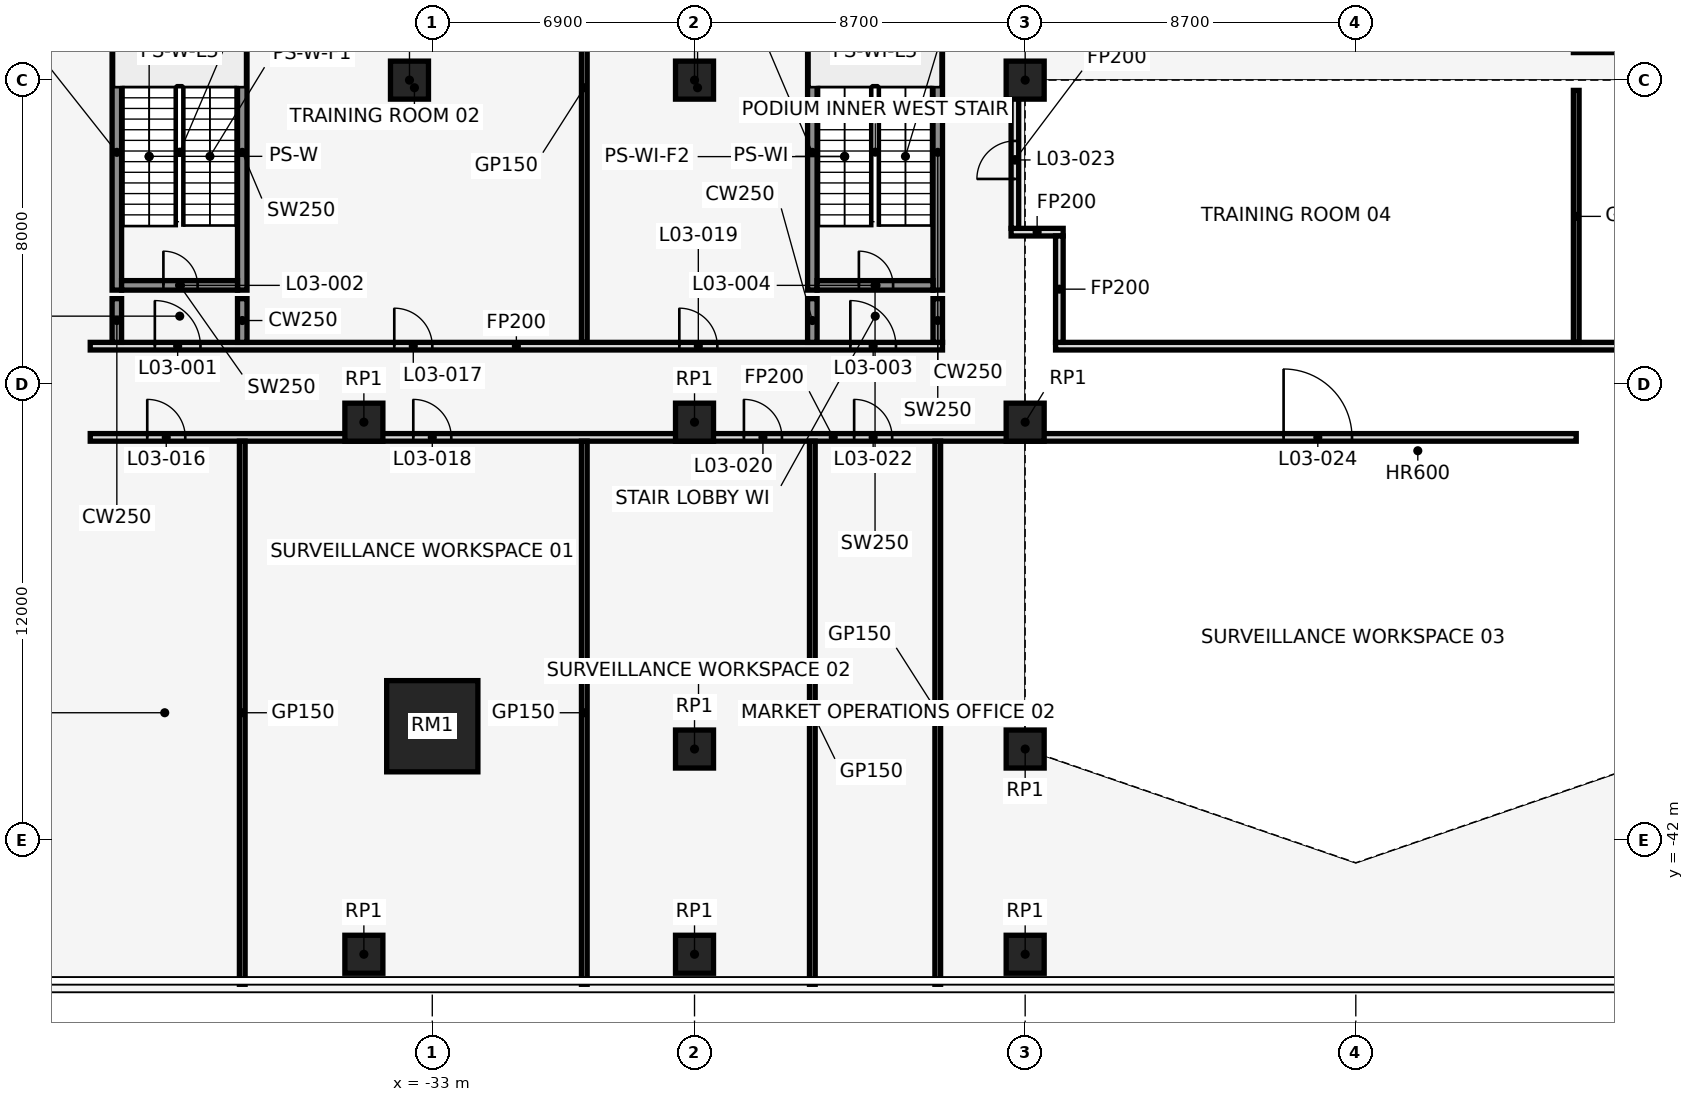
"""IFC4 building model, lengths in metres.
Left out: names, types, materials, properties, quantities, classifications, styles, units other than length and angle.
Written with IfcOpenShell. Run it as: python <this file> out.ifc"""

import sys

from ifc_helpers import new_model, si_unit, direction, frame, frame_2d, origin, origin_2d, place, context, subcontext, project, spatial, rectangle, extrude, element, fill, save


model = new_model("IFC4")
c1 = context("Model", 3, precision=1e-05, world=origin(), true_north=direction((0.0, 1.0)))
c2 = subcontext(c1, "Body", "Model", "MODEL_VIEW")
j1 = project(units=[si_unit("LENGTHUNIT", "METRE"), si_unit("PLANEANGLEUNIT", "RADIAN")], contexts=[c1])
p1 = place(None, origin())
s1 = spatial("IfcSite", under=j1, at=p1, CompositionType="ELEMENT")
p2 = place(p1, origin())
s2 = spatial("IfcBuilding", under=s1, at=p2, CompositionType="ELEMENT")
p3 = place(p2, frame((0.0, 0.0, 20.0)))
s3 = spatial("IfcBuildingStorey", under=s2, at=p3, CompositionType="ELEMENT", Elevation=20.0)
p4 = place(p3, frame((-33.0, -39.0, 0.0), z_axis=(0.0, 0.0, 1.0), x_axis=(1.0, 0.0, 0.0)))
e1 = element("IfcColumn", 1, at=p4, inside=s3, PredefinedType="COLUMN", context=c2, shape_type="SweptSolid", body=[
    extrude(rectangle(XDim=2.4, YDim=2.4, at=origin_2d()), origin(), (0.0, 0.0, 1.0), 5.0),
])
for number, where, z_axis, x_axis in (
    (2, (-26.1, -39.6, 0.0), (0.0, 0.0, 1.0), (1.0, 0.0, 0.0)),
    (3, (-17.4, -39.6, 0.0), (0.0, 0.0, 1.0), (1.0, 0.0, 0.0)),
    (4, (-33.6, -22.0, 0.0), (0.0, 0.0, 1.0), (1.0, 0.0, 0.0)),
    (5, (-26.1, -22.0, 0.0), (0.0, 0.0, 1.0), (1.0, 0.0, 0.0)),
    (6, (-17.4, -22.0, 0.0), (0.0, 0.0, 1.0), (1.0, 0.0, 0.0)),
    (7, (-34.8, -31.0, 0.0), (0.0, 0.0, 1.0), (1.0, 0.0, 0.0)),
    (8, (-34.8, -45.0, 0.0), (0.0, 0.0, 1.0), (1.0, 0.0, 0.0)),
    (9, (-26.1, -31.0, 0.0), (0.0, 0.0, 1.0), (1.0, 0.0, 0.0)),
    (10, (-26.1, -45.0, 0.0), (0.0, 0.0, 1.0), (1.0, 0.0, 0.0)),
    (11, (-17.4, -31.0, 0.0), (0.0, 0.0, 1.0), (1.0, 0.0, 0.0)),
    (12, (-17.4, -45.0, 0.0), (0.0, 0.0, 1.0), (1.0, 0.0, 0.0)),
):
    element("IfcColumn", number, at=place(p3, frame(where, z_axis=z_axis, x_axis=x_axis)), inside=s3, PredefinedType="COLUMN", context=c2, shape_type="SweptSolid", body=[
        extrude(rectangle(XDim=1.0, YDim=1.0, at=origin_2d()), origin(), (0.0, 0.0, 1.0), 5.0),
    ])
for number, where, z_axis, x_axis in (
    (13, (-41.3, -27.525, 0.0), (0.0, 0.0, 1.0), (0.0, 1.0, 0.0)),
    (14, (-38.0, -27.525, 0.0), (0.0, 0.0, 1.0), (0.0, 1.0, 0.0)),
):
    element("IfcWall", number, at=place(p3, frame(where, z_axis=z_axis, x_axis=x_axis)), inside=s3, PredefinedType="SHEAR", context=c2, shape_type="SweptSolid", body=[
        extrude(rectangle(XDim=7.25, YDim=0.25, at=frame_2d((3.625, 0.0))), origin(), (0.0, 0.0, 1.0), 5.0),
    ])
p5 = place(p3, frame((-41.175, -27.4, 0.0), z_axis=(0.0, 0.0, 1.0), x_axis=(1.0, 0.0, 0.0)))
e15 = element("IfcWall", 15, at=p5, inside=s3, PredefinedType="SHEAR", context=c2, shape_type="SweptSolid", body=[
    extrude(rectangle(XDim=3.05, YDim=0.25, at=frame_2d((1.525, 0.0))), origin(), (0.0, 0.0, 1.0), 5.0),
])
p6 = place(p5, frame((1.1, 0.0, 0.0)))
e16 = element("IfcOpeningElement", 16, at=p6, cuts=e15, PredefinedType="OPENING", context=c2, shape_type="SweptSolid", body=[
    extrude(rectangle(XDim=0.9, YDim=2.1, at=frame_2d((0.45, 1.05))), frame((0.0, 0.137, 0.0), z_axis=(0.0, -1.0, 0.0), x_axis=(1.0, 0.0, 0.0)), (0.0, 0.0, 1.0), 0.274),
])
for number, where, z_axis, x_axis in (
    (17, (-23.0, -27.525, 0.0), (0.0, 0.0, 1.0), (0.0, 1.0, 0.0)),
    (18, (-19.7, -27.525, 0.0), (0.0, 0.0, 1.0), (0.0, 1.0, 0.0)),
):
    element("IfcWall", number, at=place(p3, frame(where, z_axis=z_axis, x_axis=x_axis)), inside=s3, PredefinedType="SHEAR", context=c2, shape_type="SweptSolid", body=[
        extrude(rectangle(XDim=7.25, YDim=0.25, at=frame_2d((3.625, 0.0))), origin(), (0.0, 0.0, 1.0), 5.0),
    ])
p7 = place(p3, frame((-22.875, -27.4, 0.0), z_axis=(0.0, 0.0, 1.0), x_axis=(1.0, 0.0, 0.0)))
e19 = element("IfcWall", 19, at=p7, inside=s3, PredefinedType="SHEAR", context=c2, shape_type="SweptSolid", body=[
    extrude(rectangle(XDim=3.05, YDim=0.25, at=frame_2d((1.525, 0.0))), origin(), (0.0, 0.0, 1.0), 5.0),
])
p8 = place(p7, frame((1.1, 0.0, 0.0)))
e20 = element("IfcOpeningElement", 20, at=p8, cuts=e19, PredefinedType="OPENING", context=c2, shape_type="SweptSolid", body=[
    extrude(rectangle(XDim=0.9, YDim=2.1, at=frame_2d((0.45, 1.05))), frame((0.0, 0.137, 0.0), z_axis=(0.0, -1.0, 0.0), x_axis=(1.0, 0.0, 0.0)), (0.0, 0.0, 1.0), 0.274),
])
p9 = place(p3, frame((-42.0, -31.4, 0.0), z_axis=(0.0, 0.0, 1.0), x_axis=(1.0, 0.0, 0.0)))
e21 = element("IfcWall", 21, at=p9, inside=s3, PredefinedType="PARTITIONING", context=c2, shape_type="SweptSolid", body=[
    extrude(rectangle(XDim=39.1, YDim=0.2, at=frame_2d((19.55, 0.0))), origin(), (0.0, 0.0, 1.0), 4.7),
])
p10 = place(p9, frame((1.5, 0.0, 0.0)))
e22 = element("IfcOpeningElement", 22, at=p10, cuts=e21, PredefinedType="OPENING", context=c2, shape_type="SweptSolid", body=[
    extrude(rectangle(XDim=1.0, YDim=2.1, at=frame_2d((0.5, 1.05))), frame((0.0, 0.112, 0.0), z_axis=(0.0, -1.0, 0.0), x_axis=(1.0, 0.0, 0.0)), (0.0, 0.0, 1.0), 0.224),
])
p11 = place(p9, frame((8.5, 0.0, 0.0)))
e23 = element("IfcOpeningElement", 23, at=p11, cuts=e21, PredefinedType="OPENING", context=c2, shape_type="SweptSolid", body=[
    extrude(rectangle(XDim=1.0, YDim=2.1, at=frame_2d((0.5, 1.05))), frame((0.0, 0.112, 0.0), z_axis=(0.0, -1.0, 0.0), x_axis=(1.0, 0.0, 0.0)), (0.0, 0.0, 1.0), 0.224),
])
p12 = place(p9, frame((17.2, 0.0, 0.0)))
e24 = element("IfcOpeningElement", 24, at=p12, cuts=e21, PredefinedType="OPENING", context=c2, shape_type="SweptSolid", body=[
    extrude(rectangle(XDim=1.0, YDim=2.1, at=frame_2d((0.5, 1.05))), frame((0.0, 0.112, 0.0), z_axis=(0.0, -1.0, 0.0), x_axis=(1.0, 0.0, 0.0)), (0.0, 0.0, 1.0), 0.224),
])
p13 = place(p9, frame((20.1, 0.0, 0.0)))
e25 = element("IfcOpeningElement", 25, at=p13, cuts=e21, PredefinedType="OPENING", context=c2, shape_type="SweptSolid", body=[
    extrude(rectangle(XDim=1.0, YDim=2.1, at=frame_2d((0.5, 1.05))), frame((0.0, 0.112, 0.0), z_axis=(0.0, -1.0, 0.0), x_axis=(1.0, 0.0, 0.0)), (0.0, 0.0, 1.0), 0.224),
])
p14 = place(p9, frame((31.4, 0.0, 0.0)))
e26 = element("IfcOpeningElement", 26, at=p14, cuts=e21, PredefinedType="OPENING", context=c2, shape_type="SweptSolid", body=[
    extrude(rectangle(XDim=1.8, YDim=2.1, at=frame_2d((0.9, 1.05))), frame((0.0, 0.112, 0.0), z_axis=(0.0, -1.0, 0.0), x_axis=(1.0, 0.0, 0.0)), (0.0, 0.0, 1.0), 0.224),
])
p15 = place(p3, frame((-42.0, -29.0, 0.0), z_axis=(0.0, 0.0, 1.0), x_axis=(1.0, 0.0, 0.0)))
e27 = element("IfcWall", 27, at=p15, inside=s3, PredefinedType="PARTITIONING", context=c2, shape_type="SweptSolid", body=[
    extrude(rectangle(XDim=22.425, YDim=0.2, at=frame_2d((11.212, 0.0))), origin(), (0.0, 0.0, 1.0), 4.7),
])
p16 = place(p15, frame((1.7, 0.0, 0.0)))
e28 = element("IfcOpeningElement", 28, at=p16, cuts=e27, PredefinedType="OPENING", context=c2, shape_type="SweptSolid", body=[
    extrude(rectangle(XDim=1.2, YDim=2.1, at=frame_2d((0.6, 1.05))), frame((0.0, 0.112, 0.0), z_axis=(0.0, -1.0, 0.0), x_axis=(1.0, 0.0, 0.0)), (0.0, 0.0, 1.0), 0.224),
])
p17 = place(p15, frame((20.0, 0.0, 0.0)))
e29 = element("IfcOpeningElement", 29, at=p17, cuts=e27, PredefinedType="OPENING", context=c2, shape_type="SweptSolid", body=[
    extrude(rectangle(XDim=1.2, YDim=2.1, at=frame_2d((0.6, 1.05))), frame((0.0, 0.112, 0.0), z_axis=(0.0, -1.0, 0.0), x_axis=(1.0, 0.0, 0.0)), (0.0, 0.0, 1.0), 0.224),
])
p18 = place(p15, frame((8.0, 0.0, 0.0)))
e30 = element("IfcOpeningElement", 30, at=p18, cuts=e27, PredefinedType="OPENING", context=c2, shape_type="SweptSolid", body=[
    extrude(rectangle(XDim=1.0, YDim=2.1, at=frame_2d((0.5, 1.05))), frame((0.0, 0.112, 0.0), z_axis=(0.0, -1.0, 0.0), x_axis=(1.0, 0.0, 0.0)), (0.0, 0.0, 1.0), 0.224),
])
p19 = place(p15, frame((15.5, 0.0, 0.0)))
e31 = element("IfcOpeningElement", 31, at=p19, cuts=e27, PredefinedType="OPENING", context=c2, shape_type="SweptSolid", body=[
    extrude(rectangle(XDim=1.0, YDim=2.1, at=frame_2d((0.5, 1.05))), frame((0.0, 0.112, 0.0), z_axis=(0.0, -1.0, 0.0), x_axis=(1.0, 0.0, 0.0)), (0.0, 0.0, 1.0), 0.224),
])
p20 = place(p3, frame((-16.6, -29.0, 0.0), z_axis=(0.0, 0.0, 1.0), x_axis=(1.0, 0.0, 0.0)))
e32 = element("IfcWall", 32, at=p20, inside=s3, PredefinedType="PARTITIONING", context=c2, shape_type="SweptSolid", body=[
    extrude(rectangle(XDim=33.2, YDim=0.2, at=frame_2d((16.6, 0.0))), origin(), (0.0, 0.0, 1.0), 4.7),
])
p21 = place(p3, frame((-17.77, -26.0, 0.0), z_axis=(0.0, 0.0, 1.0), x_axis=(1.0, 0.0, 0.0)))
e33 = element("IfcWall", 33, at=p21, inside=s3, PredefinedType="PARTITIONING", context=c2, shape_type="SweptSolid", body=[
    extrude(rectangle(XDim=1.37, YDim=0.2, at=frame_2d((0.685, 0.0))), origin(), (0.0, 0.0, 1.0), 4.7),
])
p22 = place(p3, frame((-2.975, -21.2, 0.0), z_axis=(0.0, 0.0, 1.0), x_axis=(1.0, 0.0, 0.0)))
e34 = element("IfcWall", 34, at=p22, inside=s3, PredefinedType="PARTITIONING", context=c2, shape_type="SweptSolid", body=[
    extrude(rectangle(XDim=6.23, YDim=0.15, at=frame_2d((3.115, 0.0))), origin(), (0.0, 0.0, 1.0), 4.7),
])
p23 = place(p3, frame((-41.3, -28.9, 0.0), z_axis=(0.0, 0.0, 1.0), x_axis=(0.0, 1.0, 0.0)))
e35 = element("IfcWall", 35, at=p23, inside=s3, PredefinedType="SHEAR", context=c2, shape_type="SweptSolid", body=[
    extrude(rectangle(XDim=1.15, YDim=0.25, at=frame_2d((0.575, 0.0))), origin(), (0.0, 0.0, 1.0), 5.0),
])
p24 = place(p3, frame((-38.0, -45.79, 0.0), z_axis=(0.0, 0.0, 1.0), x_axis=(0.0, 1.0, 0.0)))
e36 = element("IfcWall", 36, at=p24, inside=s3, PredefinedType="PARTITIONING", context=c2, shape_type="SweptSolid", body=[
    extrude(rectangle(XDim=14.29, YDim=0.15, at=frame_2d((7.145, 0.0))), origin(), (0.0, 0.0, 1.0), 4.7),
])
p25 = place(p3, frame((-38.0, -28.9, 0.0), z_axis=(0.0, 0.0, 1.0), x_axis=(0.0, 1.0, 0.0)))
e37 = element("IfcWall", 37, at=p25, inside=s3, PredefinedType="SHEAR", context=c2, shape_type="SweptSolid", body=[
    extrude(rectangle(XDim=1.15, YDim=0.25, at=frame_2d((0.575, 0.0))), origin(), (0.0, 0.0, 1.0), 5.0),
])
p26 = place(p3, frame((-29.0, -45.79, 0.0), z_axis=(0.0, 0.0, 1.0), x_axis=(0.0, 1.0, 0.0)))
e38 = element("IfcWall", 38, at=p26, inside=s3, PredefinedType="PARTITIONING", context=c2, shape_type="SweptSolid", body=[
    extrude(rectangle(XDim=14.29, YDim=0.15, at=frame_2d((7.145, 0.0))), origin(), (0.0, 0.0, 1.0), 4.7),
])
p27 = place(p3, frame((-29.0, -28.9, 0.0), z_axis=(0.0, 0.0, 1.0), x_axis=(0.0, 1.0, 0.0)))
e39 = element("IfcWall", 39, at=p27, inside=s3, PredefinedType="PARTITIONING", context=c2, shape_type="SweptSolid", body=[
    extrude(rectangle(XDim=13.4, YDim=0.15, at=frame_2d((6.7, 0.0))), origin(), (0.0, 0.0, 1.0), 4.7),
])
p28 = place(p3, frame((-23.0, -45.79, 0.0), z_axis=(0.0, 0.0, 1.0), x_axis=(0.0, 1.0, 0.0)))
e40 = element("IfcWall", 40, at=p28, inside=s3, PredefinedType="PARTITIONING", context=c2, shape_type="SweptSolid", body=[
    extrude(rectangle(XDim=14.29, YDim=0.15, at=frame_2d((7.145, 0.0))), origin(), (0.0, 0.0, 1.0), 4.7),
])
p29 = place(p3, frame((-23.0, -28.9, 0.0), z_axis=(0.0, 0.0, 1.0), x_axis=(0.0, 1.0, 0.0)))
e41 = element("IfcWall", 41, at=p29, inside=s3, PredefinedType="SHEAR", context=c2, shape_type="SweptSolid", body=[
    extrude(rectangle(XDim=1.15, YDim=0.25, at=frame_2d((0.575, 0.0))), origin(), (0.0, 0.0, 1.0), 5.0),
])
p30 = place(p3, frame((-19.7, -45.79, 0.0), z_axis=(0.0, 0.0, 1.0), x_axis=(0.0, 1.0, 0.0)))
e42 = element("IfcWall", 42, at=p30, inside=s3, PredefinedType="PARTITIONING", context=c2, shape_type="SweptSolid", body=[
    extrude(rectangle(XDim=14.29, YDim=0.15, at=frame_2d((7.145, 0.0))), origin(), (0.0, 0.0, 1.0), 4.7),
])
p31 = place(p3, frame((-19.7, -28.9, 0.0), z_axis=(0.0, 0.0, 1.0), x_axis=(0.0, 1.0, 0.0)))
e43 = element("IfcWall", 43, at=p31, inside=s3, PredefinedType="SHEAR", context=c2, shape_type="SweptSolid", body=[
    extrude(rectangle(XDim=1.15, YDim=0.25, at=frame_2d((0.575, 0.0))), origin(), (0.0, 0.0, 1.0), 5.0),
])
p32 = place(p3, frame((-17.67, -25.9, 0.0), z_axis=(0.0, 0.0, 1.0), x_axis=(0.0, 1.0, 0.0)))
e44 = element("IfcWall", 44, at=p32, inside=s3, PredefinedType="PARTITIONING", context=c2, shape_type="SweptSolid", body=[
    extrude(rectangle(XDim=3.61, YDim=0.2, at=frame_2d((1.805, 0.0))), origin(), (0.0, 0.0, 1.0), 4.7),
])
p33 = place(p32, frame((1.3, 0.0, 0.0)))
e45 = element("IfcOpeningElement", 45, at=p33, cuts=e44, PredefinedType="OPENING", context=c2, shape_type="SweptSolid", body=[
    extrude(rectangle(XDim=1.0, YDim=2.1, at=frame_2d((0.5, 1.05))), frame((0.0, 0.112, 0.0), z_axis=(0.0, -1.0, 0.0), x_axis=(1.0, 0.0, 0.0)), (0.0, 0.0, 1.0), 0.224),
])
p34 = place(p3, frame((-16.5, -28.9, 0.0), z_axis=(0.0, 0.0, 1.0), x_axis=(0.0, 1.0, 0.0)))
e46 = element("IfcWall", 46, at=p34, inside=s3, PredefinedType="PARTITIONING", context=c2, shape_type="SweptSolid", body=[
    extrude(rectangle(XDim=2.8, YDim=0.2, at=frame_2d((1.4, 0.0))), origin(), (0.0, 0.0, 1.0), 4.7),
])
p35 = place(p3, frame((-2.9, -28.9, 0.0), z_axis=(0.0, 0.0, 1.0), x_axis=(0.0, 1.0, 0.0)))
e47 = element("IfcWall", 47, at=p35, inside=s3, PredefinedType="PARTITIONING", context=c2, shape_type="SweptSolid", body=[
    extrude(rectangle(XDim=6.63, YDim=0.15, at=frame_2d((3.315, 0.0))), origin(), (0.0, 0.0, 1.0), 4.7),
])
p36 = place(p16, origin())
e48 = element("IfcDoor", 48, at=p36, inside=s3, OperationType="SINGLE_SWING_LEFT", PredefinedType="DOOR", context=c2, shape_type="SweptSolid", body=[
    extrude(rectangle(XDim=1.2, YDim=2.1, at=frame_2d((0.6, 1.05))), frame((0.0, 0.025, 0.0), z_axis=(0.0, -1.0, 0.0), x_axis=(1.0, 0.0, 0.0)), (0.0, 0.0, 1.0), 0.05),
])
fill(e28, e48)
p37 = place(p6, origin())
e49 = element("IfcDoor", 49, at=p37, inside=s3, OperationType="SINGLE_SWING_LEFT", PredefinedType="DOOR", context=c2, shape_type="SweptSolid", body=[
    extrude(rectangle(XDim=0.9, YDim=2.1, at=frame_2d((0.45, 1.05))), frame((0.0, 0.025, 0.0), z_axis=(0.0, -1.0, 0.0), x_axis=(1.0, 0.0, 0.0)), (0.0, 0.0, 1.0), 0.05),
])
fill(e16, e49)
p38 = place(p17, origin())
e50 = element("IfcDoor", 50, at=p38, inside=s3, OperationType="SINGLE_SWING_RIGHT", PredefinedType="DOOR", context=c2, shape_type="SweptSolid", body=[
    extrude(rectangle(XDim=1.2, YDim=2.1, at=frame_2d((0.6, 1.05))), frame((0.0, 0.025, 0.0), z_axis=(0.0, -1.0, 0.0), x_axis=(1.0, 0.0, 0.0)), (0.0, 0.0, 1.0), 0.05),
])
fill(e29, e50)
p39 = place(p8, origin())
e51 = element("IfcDoor", 51, at=p39, inside=s3, OperationType="SINGLE_SWING_LEFT", PredefinedType="DOOR", context=c2, shape_type="SweptSolid", body=[
    extrude(rectangle(XDim=0.9, YDim=2.1, at=frame_2d((0.45, 1.05))), frame((0.0, 0.025, 0.0), z_axis=(0.0, -1.0, 0.0), x_axis=(1.0, 0.0, 0.0)), (0.0, 0.0, 1.0), 0.05),
])
fill(e20, e51)
p40 = place(p10, frame((1.0, 0.0, 0.0), z_axis=(0.0, 0.0, 1.0), x_axis=(-1.0, 0.0, 0.0)))
e52 = element("IfcDoor", 52, at=p40, inside=s3, OperationType="SINGLE_SWING_LEFT", PredefinedType="DOOR", context=c2, shape_type="SweptSolid", body=[
    extrude(rectangle(XDim=1.0, YDim=2.1, at=frame_2d((0.5, 1.05))), frame((0.0, 0.025, 0.0), z_axis=(0.0, -1.0, 0.0), x_axis=(1.0, 0.0, 0.0)), (0.0, 0.0, 1.0), 0.05),
])
fill(e22, e52)
p41 = place(p18, origin())
e53 = element("IfcDoor", 53, at=p41, inside=s3, OperationType="SINGLE_SWING_LEFT", PredefinedType="DOOR", context=c2, shape_type="SweptSolid", body=[
    extrude(rectangle(XDim=1.0, YDim=2.1, at=frame_2d((0.5, 1.05))), frame((0.0, 0.025, 0.0), z_axis=(0.0, -1.0, 0.0), x_axis=(1.0, 0.0, 0.0)), (0.0, 0.0, 1.0), 0.05),
])
fill(e30, e53)
p42 = place(p11, frame((1.0, 0.0, 0.0), z_axis=(0.0, 0.0, 1.0), x_axis=(-1.0, 0.0, 0.0)))
e54 = element("IfcDoor", 54, at=p42, inside=s3, OperationType="SINGLE_SWING_RIGHT", PredefinedType="DOOR", context=c2, shape_type="SweptSolid", body=[
    extrude(rectangle(XDim=1.0, YDim=2.1, at=frame_2d((0.5, 1.05))), frame((0.0, 0.025, 0.0), z_axis=(0.0, -1.0, 0.0), x_axis=(1.0, 0.0, 0.0)), (0.0, 0.0, 1.0), 0.05),
])
fill(e23, e54)
p43 = place(p19, origin())
e55 = element("IfcDoor", 55, at=p43, inside=s3, OperationType="SINGLE_SWING_LEFT", PredefinedType="DOOR", context=c2, shape_type="SweptSolid", body=[
    extrude(rectangle(XDim=1.0, YDim=2.1, at=frame_2d((0.5, 1.05))), frame((0.0, 0.025, 0.0), z_axis=(0.0, -1.0, 0.0), x_axis=(1.0, 0.0, 0.0)), (0.0, 0.0, 1.0), 0.05),
])
fill(e31, e55)
p44 = place(p12, frame((1.0, 0.0, 0.0), z_axis=(0.0, 0.0, 1.0), x_axis=(-1.0, 0.0, 0.0)))
e56 = element("IfcDoor", 56, at=p44, inside=s3, OperationType="SINGLE_SWING_RIGHT", PredefinedType="DOOR", context=c2, shape_type="SweptSolid", body=[
    extrude(rectangle(XDim=1.0, YDim=2.1, at=frame_2d((0.5, 1.05))), frame((0.0, 0.025, 0.0), z_axis=(0.0, -1.0, 0.0), x_axis=(1.0, 0.0, 0.0)), (0.0, 0.0, 1.0), 0.05),
])
fill(e24, e56)
p45 = place(p13, frame((1.0, 0.0, 0.0), z_axis=(0.0, 0.0, 1.0), x_axis=(-1.0, 0.0, 0.0)))
e57 = element("IfcDoor", 57, at=p45, inside=s3, OperationType="SINGLE_SWING_LEFT", PredefinedType="DOOR", context=c2, shape_type="SweptSolid", body=[
    extrude(rectangle(XDim=1.0, YDim=2.1, at=frame_2d((0.5, 1.05))), frame((0.0, 0.025, 0.0), z_axis=(0.0, -1.0, 0.0), x_axis=(1.0, 0.0, 0.0)), (0.0, 0.0, 1.0), 0.05),
])
fill(e25, e57)
p46 = place(p33, frame((1.0, 0.0, 0.0), z_axis=(0.0, 0.0, 1.0), x_axis=(-1.0, 0.0, 0.0)))
e58 = element("IfcDoor", 58, at=p46, inside=s3, OperationType="SINGLE_SWING_RIGHT", PredefinedType="DOOR", context=c2, shape_type="SweptSolid", body=[
    extrude(rectangle(XDim=1.0, YDim=2.1, at=frame_2d((0.5, 1.05))), frame((0.0, 0.025, 0.0), z_axis=(0.0, -1.0, 0.0), x_axis=(1.0, 0.0, 0.0)), (0.0, 0.0, 1.0), 0.05),
])
fill(e45, e58)
p47 = place(p14, origin())
e59 = element("IfcDoor", 59, at=p47, inside=s3, OperationType="SINGLE_SWING_LEFT", PredefinedType="DOOR", context=c2, shape_type="SweptSolid", body=[
    extrude(rectangle(XDim=1.8, YDim=2.1, at=frame_2d((0.9, 1.05))), frame((0.0, 0.025, 0.0), z_axis=(0.0, -1.0, 0.0), x_axis=(1.0, 0.0, 0.0)), (0.0, 0.0, 1.0), 0.05),
])
fill(e26, e59)
save(model, sys.argv[1])
